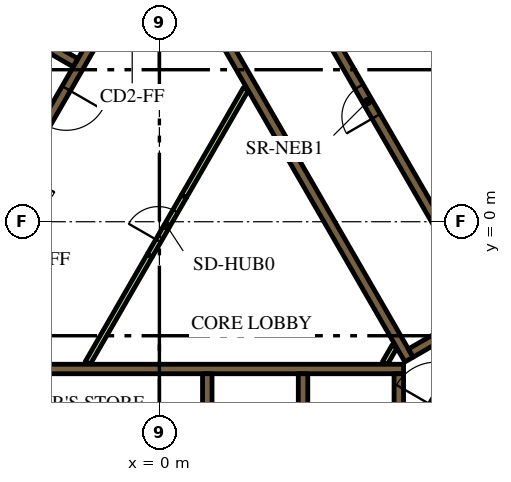
"""IFC4 building model, lengths in metres.
Left out: names, types, materials, properties, quantities, classifications, styles, units other than length and angle.
Written with IfcOpenShell. Run it as: python <this file> out.ifc"""

import sys

from ifc_helpers import new_model, si_unit, direction, frame, frame_2d, origin, place, context, subcontext, project, spatial, polyline, rectangle, outline, extrude, element, fill, save


model = new_model("IFC4")
c1 = context("Model", 3, precision=1e-05, world=origin(), true_north=direction((0.0, 1.0)))
c2 = subcontext(c1, "Body", "Model", "MODEL_VIEW")
j1 = project(units=[si_unit("LENGTHUNIT", "METRE"), si_unit("PLANEANGLEUNIT", "RADIAN")], contexts=[c1])
p1 = place(None, origin())
s1 = spatial("IfcSite", under=j1, at=p1, CompositionType="ELEMENT")
p2 = place(p1, origin())
s2 = spatial("IfcBuilding", under=s1, at=p2, CompositionType="ELEMENT")
p3 = place(p2, frame((0.0, 0.0, 87.6)))
s3 = spatial("IfcBuildingStorey", under=s2, at=p3, CompositionType="ELEMENT", Elevation=87.6)
p4 = place(p3, frame((6.776, 13.364, 0.0), z_axis=(0.0, 0.0, 1.0), x_axis=(0.500004177138, -0.8660229921, 0.0)))
e1 = element("IfcWall", 1, at=p4, inside=s3, PredefinedType="SOLIDWALL", context=c2, shape_type="SweptSolid", body=[
    extrude(rectangle(XDim=20.204, YDim=0.9, at=frame_2d((10.102, 0.0))), origin(), (0.0, 0.0, 1.0), 3.9),
])
p5 = place(p3, frame((-5.845, -3.875, 0.0), z_axis=(0.0, 0.0, 1.0), x_axis=(1.0, 0.0, 0.0)))
e2 = element("IfcWall", 2, at=p5, inside=s3, PredefinedType="SOLIDWALL", context=c2, shape_type="SweptSolid", body=[
    extrude(rectangle(XDim=12.27, YDim=0.25, at=frame_2d((6.135, 0.0))), origin(), (0.0, 0.0, 1.0), 3.9),
])
p6 = place(p3, frame((6.3, -7.268, 0.0), z_axis=(0.0, 0.0, 1.0), x_axis=(0.0, 1.0, 0.0)))
e3 = element("IfcWall", 3, at=p6, inside=s3, PredefinedType="SOLIDWALL", context=c2, shape_type="SweptSolid", body=[
    extrude(rectangle(XDim=3.268, YDim=0.25, at=frame_2d((1.634, 0.0))), origin(), (0.0, 0.0, 1.0), 3.9),
])
for number, where, z_axis, x_axis in (
    (4, (3.78, -4.0, 0.0), (0.0, 0.0, 1.0), (0.0, -1.0, 0.0)),
    (5, (1.26, -4.0, 0.0), (0.0, 0.0, 1.0), (0.0, -1.0, 0.0)),
):
    element("IfcWall", number, at=place(p3, frame(where, z_axis=z_axis, x_axis=x_axis)), inside=s3, PredefinedType="SOLIDWALL", context=c2, shape_type="SweptSolid", body=[
        extrude(rectangle(XDim=2.2, YDim=0.25, at=frame_2d((1.1, 0.0))), origin(), (0.0, 0.0, 1.0), 3.9),
    ])
p7 = place(p3, origin())
e6 = element("IfcWall", 6, at=p7, inside=s3, PredefinedType="SOLIDWALL", context=c2, shape_type="SweptSolid", body=[
    extrude(outline(polyline([(0.335, 6.925), (0.335, 7.075), (0.335, 7.075), (0.335, 7.075), (0.245, 7.075), (0.079, 7.363), (0.035, 7.439), (0.252, 7.564), (0.377, 7.348), (6.552, -3.348), (6.677, -3.564), (6.46, -3.689), (4.897, -0.981), (0.332, 6.925), (0.335, 6.925), (0.335, 6.925), (0.335, 6.925)])), origin(), (0.0, 0.0, 1.0), 3.9),
])
p8 = place(p3, frame((6.614, -3.456, 0.0), z_axis=(0.0, 0.0, 1.0), x_axis=(0.86602447079, 0.500001615989, 0.0)))
e7 = element("IfcWall", 7, at=p8, inside=s3, PredefinedType="SOLIDWALL", context=c2, shape_type="SweptSolid", body=[
    extrude(rectangle(XDim=3.154, YDim=0.25, at=frame_2d((1.577, 0.0))), origin(), (0.0, 0.0, 1.0), 3.9),
])
p9 = place(p3, frame((-8.06, -1.311, 0.0), z_axis=(0.0, 0.0, 1.0), x_axis=(0.50000273126, 0.866023826885, 0.0)))
e8 = element("IfcWall", 8, at=p9, inside=s3, PredefinedType="SOLIDWALL", context=c2, shape_type="SweptSolid", body=[
    extrude(rectangle(XDim=10.33, YDim=0.25, at=frame_2d((5.165, 0.0))), origin(), (0.0, 0.0, 1.0), 3.9),
])
p10 = place(p3, frame((-2.204, 4.182, 0.0), z_axis=(0.0, 0.0, 1.0), x_axis=(-0.866008176907, 0.50002983664, 0.0)))
e9 = element("IfcWall", 9, at=p10, inside=s3, PredefinedType="SOLIDWALL", context=c2, shape_type="SweptSolid", body=[
    extrude(rectangle(XDim=2.2, YDim=0.25, at=frame_2d((1.1, 0.0))), origin(), (0.0, 0.0, 1.0), 3.9),
])
p11 = place(p3, frame((5.936, -3.718, 0.0), z_axis=(0.0, 0.0, 1.0), x_axis=(0.499890179513, 0.866088799389, 0.0)))
e10 = element("IfcWall", 10, at=p11, inside=s3, PredefinedType="PARTITIONING", context=c2, shape_type="SweptSolid", body=[
    extrude(rectangle(XDim=0.504, YDim=0.15, at=frame_2d((0.252, 0.0))), origin(), (0.0, 0.0, 1.0), 2.75),
])
for number, where, z_axis, x_axis in (
    (11, (-1.887, -3.718, 0.0), (0.0, 0.0, 1.0), (0.5, 0.866, 0.0)),
    (12, (0.645, 0.667, 0.0), (0.0, 0.0, 1.0), (0.5, 0.866, 0.0)),
):
    element("IfcWall", number, at=place(p3, frame(where, z_axis=z_axis, x_axis=x_axis)), inside=s3, PredefinedType="PARTITIONING", context=c2, shape_type="SweptSolid", body=[
        extrude(rectangle(XDim=3.263, YDim=0.15, at=frame_2d((1.632, 0.0))), origin(), (0.0, 0.0, 1.0), 2.75),
    ])
p12 = place(p3, frame((11.553, -0.46, 0.0), z_axis=(0.0, 0.0, 1.0), x_axis=(-0.500006514828, 0.866021642414, 0.0)))
e13 = element("IfcWall", 13, at=p12, inside=s3, PredefinedType="SOLIDWALL", context=c2, shape_type="SweptSolid", body=[
    extrude(rectangle(XDim=12.35, YDim=0.25, at=frame_2d((6.175, 0.0))), origin(), (0.0, 0.0, 1.0), 3.9),
])
p13 = place(p12, frame((0.585, 0.0, 0.0)))
e14 = element("IfcOpeningElement", 14, at=p13, cuts=e13, PredefinedType="OPENING", context=c2, shape_type="SweptSolid", body=[
    extrude(rectangle(XDim=1.1, YDim=2.1, at=frame_2d((0.55, 1.05))), frame((0.0, 0.135, 0.0), z_axis=(0.0, -1.0, 0.0), x_axis=(1.0, 0.0, 0.0)), (0.0, 0.0, 1.0), 0.27),
])
p14 = place(p12, frame((3.105, 0.0, 0.0)))
e15 = element("IfcOpeningElement", 15, at=p14, cuts=e13, PredefinedType="OPENING", context=c2, shape_type="SweptSolid", body=[
    extrude(rectangle(XDim=1.1, YDim=2.1, at=frame_2d((0.55, 1.05))), frame((0.0, 0.135, 0.0), z_axis=(0.0, -1.0, 0.0), x_axis=(1.0, 0.0, 0.0)), (0.0, 0.0, 1.0), 0.27),
])
p15 = place(p12, frame((5.625, 0.0, 0.0)))
e16 = element("IfcOpeningElement", 16, at=p15, cuts=e13, PredefinedType="OPENING", context=c2, shape_type="SweptSolid", body=[
    extrude(rectangle(XDim=1.1, YDim=2.1, at=frame_2d((0.55, 1.05))), frame((0.0, 0.135, 0.0), z_axis=(0.0, -1.0, 0.0), x_axis=(1.0, 0.0, 0.0)), (0.0, 0.0, 1.0), 0.27),
])
p16 = place(p3, frame((8.565, -2.185, 0.0), z_axis=(0.0, 0.0, 1.0), x_axis=(-0.499997954832, 0.866026584559, 0.0)))
e17 = element("IfcWall", 17, at=p16, inside=s3, PredefinedType="SOLIDWALL", context=c2, shape_type="SweptSolid", body=[
    extrude(rectangle(XDim=12.35, YDim=0.25, at=frame_2d((6.175, 0.0))), origin(), (0.0, 0.0, 1.0), 3.9),
])
p17 = place(p16, frame((5.725, 0.0, 0.0)))
e18 = element("IfcOpeningElement", 18, at=p17, cuts=e17, PredefinedType="OPENING", context=c2, shape_type="SweptSolid", body=[
    extrude(rectangle(XDim=0.9, YDim=2.1, at=frame_2d((0.45, 1.05))), frame((0.0, 0.135, 0.0), z_axis=(0.0, -1.0, 0.0), x_axis=(1.0, 0.0, 0.0)), (0.0, 0.0, 1.0), 0.27),
])
p18 = place(p3, frame((-0.898, 6.194, 0.0), z_axis=(0.0, 0.0, 1.0), x_axis=(-0.499996202215, -0.866027596426, 0.0)))
e19 = element("IfcWall", 19, at=p18, inside=s3, PredefinedType="SOLIDWALL", context=c2, shape_type="SweptSolid", body=[
    extrude(rectangle(XDim=9.83, YDim=0.25, at=frame_2d((4.915, 0.0))), origin(), (0.0, 0.0, 1.0), 3.9),
])
p19 = place(p18, frame((0.585, 0.0, 0.0)))
e20 = element("IfcOpeningElement", 20, at=p19, cuts=e19, PredefinedType="OPENING", context=c2, shape_type="SweptSolid", body=[
    extrude(rectangle(XDim=1.1, YDim=2.1, at=frame_2d((0.55, 1.05))), frame((0.0, 0.135, 0.0), z_axis=(0.0, -1.0, 0.0), x_axis=(1.0, 0.0, 0.0)), (0.0, 0.0, 1.0), 0.27),
])
p20 = place(p18, frame((3.105, 0.0, 0.0)))
e21 = element("IfcOpeningElement", 21, at=p20, cuts=e19, PredefinedType="OPENING", context=c2, shape_type="SweptSolid", body=[
    extrude(rectangle(XDim=1.1, YDim=2.1, at=frame_2d((0.55, 1.05))), frame((0.0, 0.135, 0.0), z_axis=(0.0, -1.0, 0.0), x_axis=(1.0, 0.0, 0.0)), (0.0, 0.0, 1.0), 0.27),
])
p21 = place(p18, frame((5.625, 0.0, 0.0)))
e22 = element("IfcOpeningElement", 22, at=p21, cuts=e19, PredefinedType="OPENING", context=c2, shape_type="SweptSolid", body=[
    extrude(rectangle(XDim=1.1, YDim=2.1, at=frame_2d((0.55, 1.05))), frame((0.0, 0.135, 0.0), z_axis=(0.0, -1.0, 0.0), x_axis=(1.0, 0.0, 0.0)), (0.0, 0.0, 1.0), 0.27),
])
p22 = place(p18, frame((8.145, 0.0, 0.0)))
e23 = element("IfcOpeningElement", 23, at=p22, cuts=e19, PredefinedType="OPENING", context=c2, shape_type="SweptSolid", body=[
    extrude(rectangle(XDim=1.1, YDim=2.1, at=frame_2d((0.55, 1.05))), frame((0.0, 0.135, 0.0), z_axis=(0.0, -1.0, 0.0), x_axis=(1.0, 0.0, 0.0)), (0.0, 0.0, 1.0), 0.27),
])
p23 = place(p3, frame((7.053, -5.284, 0.0), z_axis=(0.0, 0.0, 1.0), x_axis=(0.500078061341, 0.865980330357, 0.0)))
e24 = element("IfcWall", 24, at=p23, inside=s3, PredefinedType="SOLIDWALL", context=c2, shape_type="SweptSolid", body=[
    extrude(rectangle(XDim=2.1, YDim=0.4, at=frame_2d((1.05, 0.0))), origin(), (0.0, 0.0, 1.0), 3.9),
])
p24 = place(p23, frame((0.45, 0.0, 0.0)))
e25 = element("IfcOpeningElement", 25, at=p24, cuts=e24, PredefinedType="OPENING", context=c2, shape_type="SweptSolid", body=[
    extrude(rectangle(XDim=1.2, YDim=2.1, at=frame_2d((0.6, 1.05))), frame((0.0, 0.21, 0.0), z_axis=(0.0, -1.0, 0.0), x_axis=(1.0, 0.0, 0.0)), (0.0, 0.0, 1.0), 0.42),
])
p25 = place(p3, frame((-0.255, -0.892, 0.0), z_axis=(0.0, 0.0, 1.0), x_axis=(0.500062916607, 0.865989075817, 0.0)))
e26 = element("IfcWall", 26, at=p25, inside=s3, PredefinedType="PARTITIONING", context=c2, shape_type="SweptSolid", body=[
    extrude(rectangle(XDim=1.8, YDim=0.15, at=frame_2d((0.9, 0.0))), origin(), (0.0, 0.0, 1.0), 2.75),
])
p26 = place(p25, frame((0.45, 0.0, 0.0)))
e27 = element("IfcOpeningElement", 27, at=p26, cuts=e26, PredefinedType="OPENING", context=c2, shape_type="SweptSolid", body=[
    extrude(rectangle(XDim=0.9, YDim=2.1, at=frame_2d((0.45, 1.05))), frame((0.0, 0.085, 0.0), z_axis=(0.0, -1.0, 0.0), x_axis=(1.0, 0.0, 0.0)), (0.0, 0.0, 1.0), 0.17),
])
p27 = place(p3, frame((6.163, 18.475, 0.0), z_axis=(0.0, 0.0, 1.0), x_axis=(0.500001317485, -0.866024643133, 0.0)))
e28 = element("IfcWall", 28, at=p27, inside=s3, PredefinedType="PARTITIONING", context=c2, shape_type="SweptSolid", body=[
    extrude(rectangle(XDim=25.767, YDim=0.15, at=frame_2d((12.883, 0.0))), origin(), (0.0, 0.0, 1.0), 2.75),
])
p28 = place(p27, frame((24.241, 0.0, 0.0)))
e29 = element("IfcOpeningElement", 29, at=p28, cuts=e28, PredefinedType="OPENING", context=c2, shape_type="SweptSolid", body=[
    extrude(rectangle(XDim=1.0, YDim=2.1, at=frame_2d((0.5, 1.05))), frame((0.0, 0.085, 0.0), z_axis=(0.0, -1.0, 0.0), x_axis=(1.0, 0.0, 0.0)), (0.0, 0.0, 1.0), 0.17),
])
p29 = place(p27, frame((13.144, 0.0, 0.0)))
e30 = element("IfcOpeningElement", 30, at=p29, cuts=e28, PredefinedType="OPENING", context=c2, shape_type="SweptSolid", body=[
    extrude(rectangle(XDim=1.0, YDim=2.1, at=frame_2d((0.5, 1.05))), frame((0.0, 0.085, 0.0), z_axis=(0.0, -1.0, 0.0), x_axis=(1.0, 0.0, 0.0)), (0.0, 0.0, 1.0), 0.17),
])
p30 = place(p27, frame((10.874, 0.0, 0.0)))
e31 = element("IfcOpeningElement", 31, at=p30, cuts=e28, PredefinedType="OPENING", context=c2, shape_type="SweptSolid", body=[
    extrude(rectangle(XDim=0.9, YDim=2.1, at=frame_2d((0.45, 1.05))), frame((0.0, 0.085, 0.0), z_axis=(0.0, -1.0, 0.0), x_axis=(1.0, 0.0, 0.0)), (0.0, 0.0, 1.0), 0.17),
])
p31 = place(p27, frame((3.718, 0.0, 0.0)))
e32 = element("IfcOpeningElement", 32, at=p31, cuts=e28, PredefinedType="OPENING", context=c2, shape_type="SweptSolid", body=[
    extrude(rectangle(XDim=1.1, YDim=2.1, at=frame_2d((0.55, 1.05))), frame((0.0, 0.085, 0.0), z_axis=(0.0, -1.0, 0.0), x_axis=(1.0, 0.0, 0.0)), (0.0, 0.0, 1.0), 0.17),
])
p32 = place(p27, frame((2.411, 0.0, 0.0)))
e33 = element("IfcOpeningElement", 33, at=p32, cuts=e28, PredefinedType="OPENING", context=c2, shape_type="SweptSolid", body=[
    extrude(rectangle(XDim=1.0, YDim=2.1, at=frame_2d((0.5, 1.05))), frame((0.0, 0.085, 0.0), z_axis=(0.0, -1.0, 0.0), x_axis=(1.0, 0.0, 0.0)), (0.0, 0.0, 1.0), 0.17),
])
p33 = place(p17, origin())
e34 = element("IfcDoor", 34, at=p33, inside=s3, OperationType="SINGLE_SWING_LEFT", PredefinedType="DOOR", context=c2, shape_type="SweptSolid", body=[
    extrude(rectangle(XDim=0.9, YDim=2.1, at=frame_2d((0.45, 1.05))), frame((0.0, 0.025, 0.0), z_axis=(0.0, -1.0, 0.0), x_axis=(1.0, 0.0, 0.0)), (0.0, 0.0, 1.0), 0.05),
])
fill(e18, e34)
p34 = place(p20, origin())
e35 = element("IfcDoor", 35, at=p34, inside=s3, OperationType="DOUBLE_DOOR_SLIDING", PredefinedType="DOOR", context=c2, shape_type="SweptSolid", body=[
    extrude(rectangle(XDim=1.1, YDim=2.1, at=frame_2d((0.55, 1.05))), frame((0.0, 0.025, 0.0), z_axis=(0.0, -1.0, 0.0), x_axis=(1.0, 0.0, 0.0)), (0.0, 0.0, 1.0), 0.05),
])
fill(e21, e35)
p35 = place(p26, origin())
e36 = element("IfcDoor", 36, at=p35, inside=s3, OperationType="SINGLE_SWING_LEFT", PredefinedType="DOOR", context=c2, shape_type="SweptSolid", body=[
    extrude(rectangle(XDim=0.9, YDim=2.1, at=frame_2d((0.45, 1.05))), frame((0.0, 0.025, 0.0), z_axis=(0.0, -1.0, 0.0), x_axis=(1.0, 0.0, 0.0)), (0.0, 0.0, 1.0), 0.05),
])
fill(e27, e36)
save(model, sys.argv[1])
